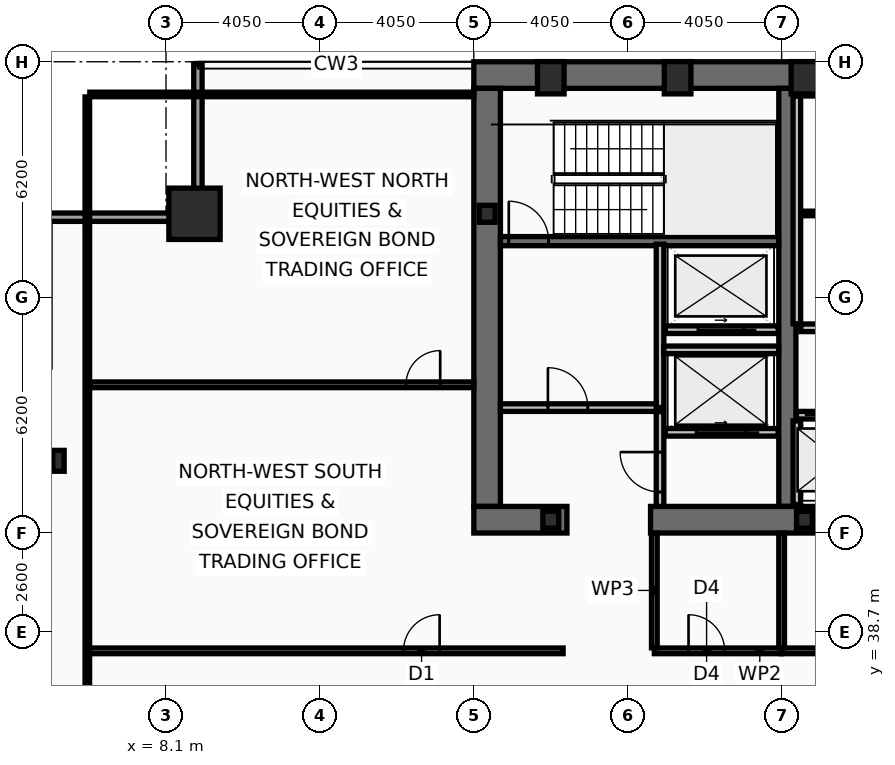
"""IFC4 building model, lengths in metres.
Left out: names, types, materials, properties, quantities, classifications, styles, units other than length and angle.
Written with IfcOpenShell. Run it as: python <this file> out.ifc"""

import sys

from ifc_helpers import new_model, si_unit, direction, frame, frame_2d, origin, origin_2d, place, context, subcontext, project, spatial, rectangle, hollow_rectangle, i_section, extrude, element, fill, save


model = new_model("IFC4")
c1 = context("Model", 3, precision=1e-05, world=origin(), true_north=direction((0.0, 1.0)))
c2 = subcontext(c1, "Body", "Model", "MODEL_VIEW")
j1 = project(units=[si_unit("LENGTHUNIT", "METRE"), si_unit("PLANEANGLEUNIT", "RADIAN")], contexts=[c1])
p1 = place(None, origin())
s1 = spatial("IfcSite", under=j1, at=p1, CompositionType="ELEMENT")
p2 = place(p1, origin())
s2 = spatial("IfcBuilding", under=s1, at=p2, CompositionType="ELEMENT")
p3 = place(p2, frame((0.0, 0.0, 154.2)))
s3 = spatial("IfcBuildingStorey", under=s2, at=p3, CompositionType="ELEMENT", Elevation=154.2)
p4 = place(p3, frame((16.2, 53.35, 0.0), z_axis=(0.0, 0.0, 1.0), x_axis=(1.0, 0.0, 0.0)))
e1 = element("IfcWall", 1, at=p4, inside=s3, PredefinedType="SHEAR", context=c2, shape_type="SweptSolid", body=[
    extrude(rectangle(XDim=40.5, YDim=0.7, at=frame_2d((20.25, 0.0))), origin(), (0.0, 0.0, 1.0), 3.44),
])
p5 = place(p3, frame((16.55, 42.0, 0.0), z_axis=(0.0, 0.0, 1.0), x_axis=(0.0, 1.0, 0.0)))
e2 = element("IfcWall", 2, at=p5, inside=s3, PredefinedType="SHEAR", context=c2, shape_type="SweptSolid", body=[
    extrude(rectangle(XDim=11.0, YDim=0.7, at=frame_2d((5.5, 0.0))), origin(), (0.0, 0.0, 1.0), 3.44),
])
p6 = place(p3, frame((24.45, 42.0, 0.0), z_axis=(0.0, 0.0, 1.0), x_axis=(0.0, 1.0, 0.0)))
e3 = element("IfcWall", 3, at=p6, inside=s3, PredefinedType="SHEAR", context=c2, shape_type="SweptSolid", body=[
    extrude(rectangle(XDim=11.0, YDim=0.45, at=frame_2d((5.5, 0.0))), origin(), (0.0, 0.0, 1.0), 3.44),
])
p7 = place(p3, frame((18.65, 41.65, 0.0), z_axis=(0.0, 0.0, 1.0), x_axis=(-1.0, 0.0, 0.0)))
e4 = element("IfcWall", 4, at=p7, inside=s3, PredefinedType="SHEAR", context=c2, shape_type="SweptSolid", body=[
    extrude(rectangle(XDim=2.45, YDim=0.7, at=frame_2d((1.225, 0.0))), origin(), (0.0, 0.0, 1.0), 3.44),
])
p8 = place(p3, frame((32.3, 41.65, 0.0), z_axis=(0.0, 0.0, 1.0), x_axis=(-1.0, 0.0, 0.0)))
e5 = element("IfcWall", 5, at=p8, inside=s3, PredefinedType="SHEAR", context=c2, shape_type="SweptSolid", body=[
    extrude(rectangle(XDim=11.45, YDim=0.7, at=frame_2d((5.725, 0.0))), origin(), (0.0, 0.0, 1.0), 3.44),
])
p9 = place(p3, frame((16.9, 48.98, 0.0), z_axis=(0.0, 0.0, 1.0), x_axis=(1.0, 0.0, 0.0)))
e6 = element("IfcWall", 6, at=p9, inside=s3, PredefinedType="SHEAR", context=c2, shape_type="SweptSolid", body=[
    extrude(rectangle(XDim=7.32, YDim=0.24, at=frame_2d((3.66, 0.0))), origin(), (0.0, 0.0, 1.0), 3.44),
])
p10 = place(p9, frame((0.22, 0.0, 0.0)))
e7 = element("IfcOpeningElement", 7, at=p10, cuts=e6, PredefinedType="OPENING", context=c2, shape_type="SweptSolid", body=[
    extrude(rectangle(XDim=1.05, YDim=2.15, at=frame_2d((0.525, 1.075))), frame((0.0, 0.13, 0.0), z_axis=(0.0, -1.0, 0.0), x_axis=(1.0, 0.0, 0.0)), (0.0, 0.0, 1.0), 0.26),
])
p11 = place(p3, frame((8.85, 49.7, 0.0), z_axis=(0.0, 0.0, 1.0), x_axis=(1.0, 0.0, 0.0)))
e8 = element("IfcColumn", 8, at=p11, inside=s3, PredefinedType="COLUMN", context=c2, shape_type="SweptSolid", body=[
    extrude(hollow_rectangle(XDim=1.35, YDim=1.35, WallThickness=0.065, at=origin_2d()), origin(), (0.0, 0.0, 1.0), 3.6),
])
for number, where, z_axis, x_axis in (
    (9, (18.225, 53.28, 0.0), (0.0, 0.0, 1.0), (1.0, 0.0, 0.0)),
    (10, (21.562, 53.28, 0.0), (0.0, 0.0, 1.0), (1.0, 0.0, 0.0)),
    (11, (24.9, 53.28, 0.0), (0.0, 0.0, 1.0), (1.0, 0.0, 0.0)),
):
    element("IfcColumn", number, at=place(p3, frame(where, z_axis=z_axis, x_axis=x_axis)), inside=s3, PredefinedType="COLUMN", context=c2, shape_type="SweptSolid", body=[
        extrude(hollow_rectangle(XDim=0.7, YDim=0.85, WallThickness=0.05, at=origin_2d()), origin(), (0.0, 0.0, 1.0), 3.6),
    ])
p12 = place(p3, frame((5.27, 43.2, 0.0), z_axis=(0.0, 0.0, 1.0), x_axis=(1.0, 0.0, 0.0)))
e12 = element("IfcColumn", 12, at=p12, inside=s3, PredefinedType="COLUMN", context=c2, shape_type="SweptSolid", body=[
    extrude(i_section(OverallWidth=0.3, OverallDepth=0.55, WebThickness=0.015, FlangeThickness=0.029, at=origin_2d()), origin(), (0.0, 0.0, 1.0), 3.6),
])
for number, where, z_axis, x_axis in (
    (13, (16.55, 49.7, 0.0), (0.0, 0.0, 1.0), (1.0, 0.0, 0.0)),
    (14, (18.225, 41.65, 0.0), (0.0, 0.0, 1.0), (1.0, 0.0, 0.0)),
    (15, (24.9, 41.65, 0.0), (0.0, 0.0, 1.0), (1.0, 0.0, 0.0)),
):
    element("IfcColumn", number, at=place(p3, frame(where, z_axis=z_axis, x_axis=x_axis)), inside=s3, PredefinedType="COLUMN", context=c2, shape_type="SweptSolid", body=[
        extrude(i_section(OverallWidth=0.416, OverallDepth=0.446, WebThickness=0.039, FlangeThickness=0.063, at=origin_2d()), origin(), (0.0, 0.0, 1.0), 3.6),
    ])
p13 = place(p3, frame((4.83, 49.61, 0.0), z_axis=(0.0, 0.0, 1.0), x_axis=(1.0, 0.0, 0.0)))
e16 = element("IfcWall", 16, at=p13, inside=s3, PredefinedType="SOLIDWALL", context=c2, shape_type="SweptSolid", body=[
    extrude(rectangle(XDim=4.22, YDim=0.22, at=frame_2d((2.11, 0.0))), origin(), (0.0, 0.0, 1.0), 2.83),
])
p14 = place(p3, frame((8.94, 49.72, 0.0), z_axis=(0.0, 0.0, 1.0), x_axis=(0.0, 1.0, 0.0)))
e17 = element("IfcWall", 17, at=p14, inside=s3, PredefinedType="SOLIDWALL", context=c2, shape_type="SweptSolid", body=[
    extrude(rectangle(XDim=3.91, YDim=0.22, at=frame_2d((1.955, 0.0))), origin(), (0.0, 0.0, 1.0), 2.83),
])
p15 = place(p3, frame((24.69, 44.4, 0.0), z_axis=(0.0, 0.0, 1.0), x_axis=(1.0, 0.0, 0.0)))
e18 = element("IfcWall", 18, at=p15, inside=s3, PredefinedType="PARTITIONING", context=c2, shape_type="SweptSolid", body=[
    extrude(rectangle(XDim=6.53, YDim=0.2, at=frame_2d((3.265, 0.0))), origin(), (0.0, 0.0, 1.0), 3.44),
])
p16 = place(p15, frame((0.53, 0.0, 0.0)))
e19 = element("IfcOpeningElement", 19, at=p16, cuts=e18, PredefinedType="OPENING", context=c2, shape_type="SweptSolid", body=[
    extrude(rectangle(XDim=1.1, YDim=2.18, at=frame_2d((0.55, 1.09))), frame((0.0, 0.11, 0.0), z_axis=(0.0, -1.0, 0.0), x_axis=(1.0, 0.0, 0.0)), (0.0, 0.0, 1.0), 0.22),
])
p17 = place(p15, frame((2.69, 0.0, 0.0)))
e20 = element("IfcOpeningElement", 20, at=p17, cuts=e18, PredefinedType="OPENING", context=c2, shape_type="SweptSolid", body=[
    extrude(rectangle(XDim=1.1, YDim=2.18, at=frame_2d((0.55, 1.09))), frame((0.0, 0.11, 0.0), z_axis=(0.0, -1.0, 0.0), x_axis=(1.0, 0.0, 0.0)), (0.0, 0.0, 1.0), 0.22),
])
p18 = place(p15, frame((4.85, 0.0, 0.0)))
e21 = element("IfcOpeningElement", 21, at=p18, cuts=e18, PredefinedType="OPENING", context=c2, shape_type="SweptSolid", body=[
    extrude(rectangle(XDim=1.1, YDim=2.18, at=frame_2d((0.55, 1.09))), frame((0.0, 0.11, 0.0), z_axis=(0.0, -1.0, 0.0), x_axis=(1.0, 0.0, 0.0)), (0.0, 0.0, 1.0), 0.22),
])
p19 = place(p3, frame((24.21, 43.95, 0.0), z_axis=(0.0, 0.0, 1.0), x_axis=(-1.0, 0.0, 0.0)))
e22 = element("IfcWall", 22, at=p19, inside=s3, PredefinedType="PARTITIONING", context=c2, shape_type="SweptSolid", body=[
    extrude(rectangle(XDim=2.97, YDim=0.2, at=frame_2d((1.485, 0.0))), origin(), (0.0, 0.0, 1.0), 3.44),
])
p20 = place(p19, frame((0.86, 0.0, 0.0)))
e23 = element("IfcOpeningElement", 23, at=p20, cuts=e22, PredefinedType="OPENING", context=c2, shape_type="SweptSolid", body=[
    extrude(rectangle(XDim=1.3, YDim=2.18, at=frame_2d((0.65, 1.09))), frame((0.0, 0.11, 0.0), z_axis=(0.0, -1.0, 0.0), x_axis=(1.0, 0.0, 0.0)), (0.0, 0.0, 1.0), 0.22),
])
p21 = place(p3, frame((24.21, 46.65, 0.0), z_axis=(0.0, 0.0, 1.0), x_axis=(-1.0, 0.0, 0.0)))
e24 = element("IfcWall", 24, at=p21, inside=s3, PredefinedType="PARTITIONING", context=c2, shape_type="SweptSolid", body=[
    extrude(rectangle(XDim=2.97, YDim=0.2, at=frame_2d((1.485, 0.0))), origin(), (0.0, 0.0, 1.0), 3.44),
])
p22 = place(p21, frame((0.91, 0.0, 0.0)))
e25 = element("IfcOpeningElement", 25, at=p22, cuts=e24, PredefinedType="OPENING", context=c2, shape_type="SweptSolid", body=[
    extrude(rectangle(XDim=1.2, YDim=2.18, at=frame_2d((0.6, 1.09))), frame((0.0, 0.11, 0.0), z_axis=(0.0, -1.0, 0.0), x_axis=(1.0, 0.0, 0.0)), (0.0, 0.0, 1.0), 0.22),
])
p23 = place(p3, frame((21.1, 44.6, 0.0), z_axis=(0.0, 0.0, 1.0), x_axis=(0.0, 1.0, 0.0)))
e26 = element("IfcWall", 26, at=p23, inside=s3, PredefinedType="PARTITIONING", context=c2, shape_type="SweptSolid", body=[
    extrude(rectangle(XDim=4.3, YDim=0.2, at=frame_2d((2.15, 0.0))), origin(), (0.0, 0.0, 1.0), 3.44),
])
p24 = place(p3, frame((16.9, 44.6, 0.0), z_axis=(0.0, 0.0, 1.0), x_axis=(1.0, 0.0, 0.0)))
e27 = element("IfcWall", 27, at=p24, inside=s3, PredefinedType="PARTITIONING", context=c2, shape_type="SweptSolid", body=[
    extrude(rectangle(XDim=4.1, YDim=0.2, at=frame_2d((2.05, 0.0))), origin(), (0.0, 0.0, 1.0), 3.44),
])
p25 = place(p24, frame((1.25, 0.0, 0.0)))
e28 = element("IfcOpeningElement", 28, at=p25, cuts=e27, PredefinedType="OPENING", context=c2, shape_type="SweptSolid", body=[
    extrude(rectangle(XDim=1.05, YDim=2.15, at=frame_2d((0.525, 1.075))), frame((0.0, 0.11, 0.0), z_axis=(0.0, -1.0, 0.0), x_axis=(1.0, 0.0, 0.0)), (0.0, 0.0, 1.0), 0.22),
])
p26 = place(p3, frame((21.2, 46.12, 0.0), z_axis=(0.0, 0.0, 1.0), x_axis=(1.0, 0.0, 0.0)))
e29 = element("IfcWall", 29, at=p26, inside=s3, PredefinedType="PARTITIONING", context=c2, shape_type="SweptSolid", body=[
    extrude(rectangle(XDim=3.02, YDim=0.2, at=frame_2d((1.51, 0.0))), origin(), (0.0, 0.0, 1.0), 3.44),
])
p27 = place(p3, frame((21.1, 42.0, 0.0), z_axis=(0.0, 0.0, 1.0), x_axis=(0.0, 1.0, 0.0)))
e30 = element("IfcWall", 30, at=p27, inside=s3, PredefinedType="PARTITIONING", context=c2, shape_type="SweptSolid", body=[
    extrude(rectangle(XDim=2.495, YDim=0.2, at=frame_2d((1.248, 0.0))), origin(), (0.0, 0.0, 1.0), 3.44),
])
p28 = place(p27, frame((0.38, 0.0, 0.0)))
e31 = element("IfcOpeningElement", 31, at=p28, cuts=e30, PredefinedType="OPENING", context=c2, shape_type="SweptSolid", body=[
    extrude(rectangle(XDim=1.05, YDim=2.15, at=frame_2d((0.525, 1.075))), frame((0.0, 0.11, 0.0), z_axis=(0.0, -1.0, 0.0), x_axis=(1.0, 0.0, 0.0)), (0.0, 0.0, 1.0), 0.22),
])
p29 = place(p3, frame((24.7, 46.805, 0.0), z_axis=(0.0, 0.0, 1.0), x_axis=(0.0, 1.0, 0.0)))
e32 = element("IfcWall", 32, at=p29, inside=s3, PredefinedType="PARTITIONING", context=c2, shape_type="SweptSolid", body=[
    extrude(rectangle(XDim=5.99, YDim=0.2, at=frame_2d((2.995, 0.0))), origin(), (0.0, 0.0, 1.0), 3.44),
])
p30 = place(p3, frame((24.805, 52.86, 0.0), z_axis=(0.0, 0.0, 1.0), x_axis=(1.0, 0.0, 0.0)))
e33 = element("IfcWall", 33, at=p30, inside=s3, PredefinedType="PARTITIONING", context=c2, shape_type="SweptSolid", body=[
    extrude(rectangle(XDim=7.51, YDim=0.12, at=frame_2d((3.755, 0.0))), origin(), (0.0, 0.0, 1.0), 3.44),
])
p31 = place(p3, frame((24.805, 49.709, 0.0), z_axis=(0.0, 0.0, 1.0), x_axis=(1.0, 0.0, 0.0)))
e34 = element("IfcWall", 34, at=p31, inside=s3, PredefinedType="PARTITIONING", context=c2, shape_type="SweptSolid", body=[
    extrude(rectangle(XDim=7.51, YDim=0.12, at=frame_2d((3.755, 0.0))), origin(), (0.0, 0.0, 1.0), 3.44),
])
p32 = place(p31, frame((2.4, 0.0, 0.0)))
e35 = element("IfcOpeningElement", 35, at=p32, cuts=e34, PredefinedType="OPENING", context=c2, shape_type="SweptSolid", body=[
    extrude(rectangle(XDim=0.9, YDim=2.05, at=frame_2d((0.45, 1.025))), frame((0.0, 0.07, 0.0), z_axis=(0.0, -1.0, 0.0), x_axis=(1.0, 0.0, 0.0)), (0.0, 0.0, 1.0), 0.14),
])
p33 = place(p3, frame((24.805, 46.7, 0.0), z_axis=(0.0, 0.0, 1.0), x_axis=(1.0, 0.0, 0.0)))
e36 = element("IfcWall", 36, at=p33, inside=s3, PredefinedType="PARTITIONING", context=c2, shape_type="SweptSolid", body=[
    extrude(rectangle(XDim=7.51, YDim=0.2, at=frame_2d((3.755, 0.0))), origin(), (0.0, 0.0, 1.0), 3.44),
])
p34 = place(p33, frame((2.4, 0.0, 0.0)))
e37 = element("IfcOpeningElement", 37, at=p34, cuts=e36, PredefinedType="OPENING", context=c2, shape_type="SweptSolid", body=[
    extrude(rectangle(XDim=0.95, YDim=2.1, at=frame_2d((0.475, 1.05))), frame((0.0, 0.11, 0.0), z_axis=(0.0, -1.0, 0.0), x_axis=(1.0, 0.0, 0.0)), (0.0, 0.0, 1.0), 0.22),
])
p35 = place(p3, frame((24.7, 42.05, 0.0), z_axis=(0.0, 0.0, 1.0), x_axis=(0.0, 1.0, 0.0)))
e38 = element("IfcWall", 38, at=p35, inside=s3, PredefinedType="PARTITIONING", context=c2, shape_type="SweptSolid", body=[
    extrude(rectangle(XDim=2.2, YDim=0.2, at=frame_2d((1.1, 0.0))), origin(), (0.0, 0.0, 1.0), 3.44),
])
p36 = place(p3, frame((20.95, 38.2, 0.0), z_axis=(0.0, 0.0, 1.0), x_axis=(1.0, 0.0, 0.0)))
e39 = element("IfcWall", 39, at=p36, inside=s3, PredefinedType="PARTITIONING", context=c2, shape_type="SweptSolid", body=[
    extrude(rectangle(XDim=3.35, YDim=0.15, at=frame_2d((1.675, 0.0))), origin(), (0.0, 0.0, 1.0), 3.44),
])
p37 = place(p36, frame((0.9, 0.0, 0.0)))
e40 = element("IfcOpeningElement", 40, at=p37, cuts=e39, PredefinedType="OPENING", context=c2, shape_type="SweptSolid", body=[
    extrude(rectangle(XDim=0.95, YDim=2.05, at=frame_2d((0.475, 1.025))), frame((0.0, 0.085, 0.0), z_axis=(0.0, -1.0, 0.0), x_axis=(1.0, 0.0, 0.0)), (0.0, 0.0, 1.0), 0.17),
])
p38 = place(p3, frame((24.3, 38.2, 0.0), z_axis=(0.0, 0.0, 1.0), x_axis=(1.0, 0.0, 0.0)))
e41 = element("IfcWall", 41, at=p38, inside=s3, PredefinedType="PARTITIONING", context=c2, shape_type="SweptSolid", body=[
    extrude(rectangle(XDim=4.9, YDim=0.15, at=frame_2d((2.45, 0.0))), origin(), (0.0, 0.0, 1.0), 2.73),
])
p39 = place(p38, frame((0.9, 0.0, 0.0)))
e42 = element("IfcOpeningElement", 42, at=p39, cuts=e41, PredefinedType="OPENING", context=c2, shape_type="SweptSolid", body=[
    extrude(rectangle(XDim=0.95, YDim=2.05, at=frame_2d((0.475, 1.025))), frame((0.0, 0.085, 0.0), z_axis=(0.0, -1.0, 0.0), x_axis=(1.0, 0.0, 0.0)), (0.0, 0.0, 1.0), 0.17),
])
for number, where, z_axis, x_axis in (
    (43, (20.95, 38.28, 0.0), (0.0, 0.0, 1.0), (0.0, 1.0, 0.0)),
    (44, (24.3, 38.28, 0.0), (0.0, 0.0, 1.0), (0.0, 1.0, 0.0)),
):
    element("IfcWall", number, at=place(p3, frame(where, z_axis=z_axis, x_axis=x_axis)), inside=s3, PredefinedType="PARTITIONING", context=c2, shape_type="SweptSolid", body=[
        extrude(rectangle(XDim=3.02, YDim=0.15, at=frame_2d((1.51, 0.0))), origin(), (0.0, 0.0, 1.0), 3.44),
    ])
p40 = place(p3, frame((6.03, 38.2, 0.0), z_axis=(0.0, 0.0, 1.0), x_axis=(1.0, 0.0, 0.0)))
e45 = element("IfcWall", 45, at=p40, inside=s3, PredefinedType="PARTITIONING", context=c2, shape_type="SweptSolid", body=[
    extrude(rectangle(XDim=12.52, YDim=0.15, at=frame_2d((6.26, 0.0))), origin(), (0.0, 0.0, 1.0), 2.73),
])
p41 = place(p40, frame((8.32, 0.0, 0.0)))
e46 = element("IfcOpeningElement", 46, at=p41, cuts=e45, PredefinedType="OPENING", context=c2, shape_type="SweptSolid", body=[
    extrude(rectangle(XDim=0.95, YDim=2.05, at=frame_2d((0.475, 1.025))), frame((0.0, 0.085, 0.0), z_axis=(0.0, -1.0, 0.0), x_axis=(1.0, 0.0, 0.0)), (0.0, 0.0, 1.0), 0.17),
])
p42 = place(p3, frame((6.095, 45.2, 0.0), z_axis=(0.0, 0.0, 1.0), x_axis=(1.0, 0.0, 0.0)))
e47 = element("IfcWall", 47, at=p42, inside=s3, PredefinedType="PARTITIONING", context=c2, shape_type="SweptSolid", body=[
    extrude(rectangle(XDim=10.105, YDim=0.15, at=frame_2d((5.052, 0.0))), origin(), (0.0, 0.0, 1.0), 2.83),
])
p43 = place(p42, frame((8.32, 0.0, 0.0)))
e48 = element("IfcOpeningElement", 48, at=p43, cuts=e47, PredefinedType="OPENING", context=c2, shape_type="SweptSolid", body=[
    extrude(rectangle(XDim=0.9, YDim=2.05, at=frame_2d((0.45, 1.025))), frame((0.0, 0.085, 0.0), z_axis=(0.0, -1.0, 0.0), x_axis=(1.0, 0.0, 0.0)), (0.0, 0.0, 1.0), 0.17),
])
p44 = place(p3, frame((6.03, 10.665, 0.0), z_axis=(0.0, 0.0, 1.0), x_axis=(0.0, 1.0, 0.0)))
e49 = element("IfcWall", 49, at=p44, inside=s3, PredefinedType="PARTITIONING", context=c2, shape_type="SweptSolid", body=[
    extrude(rectangle(XDim=42.11, YDim=0.12, at=frame_2d((21.055, 0.0))), origin(), (0.0, 0.0, 1.0), 2.73),
])
p45 = place(p3, frame((6.095, 52.84, 0.0), z_axis=(0.0, 0.0, 1.0), x_axis=(1.0, 0.0, 0.0)))
e50 = element("IfcWall", 50, at=p45, inside=s3, PredefinedType="PARTITIONING", context=c2, shape_type="SweptSolid", body=[
    extrude(rectangle(XDim=10.105, YDim=0.12, at=frame_2d((5.052, 0.0))), origin(), (0.0, 0.0, 1.0), 3.44),
])
p46 = place(p10, origin())
e51 = element("IfcDoor", 51, at=p46, inside=s3, OperationType="SINGLE_SWING_LEFT", PredefinedType="DOOR", context=c2, shape_type="SweptSolid", body=[
    extrude(rectangle(XDim=1.05, YDim=2.15, at=frame_2d((0.525, 1.075))), frame((0.0, 0.025, 0.0), z_axis=(0.0, -1.0, 0.0), x_axis=(1.0, 0.0, 0.0)), (0.0, 0.0, 1.0), 0.05),
])
fill(e7, e51)
p47 = place(p20, origin())
e52 = element("IfcDoor", 52, at=p47, inside=s3, OperationType="SLIDING_TO_LEFT", PredefinedType="DOOR", context=c2, shape_type="SweptSolid", body=[
    extrude(rectangle(XDim=1.3, YDim=2.18, at=frame_2d((0.65, 1.09))), frame((0.0, 0.025, 0.0), z_axis=(0.0, -1.0, 0.0), x_axis=(1.0, 0.0, 0.0)), (0.0, 0.0, 1.0), 0.05),
])
fill(e23, e52)
p48 = place(p22, origin())
e53 = element("IfcDoor", 53, at=p48, inside=s3, OperationType="SLIDING_TO_LEFT", PredefinedType="DOOR", context=c2, shape_type="SweptSolid", body=[
    extrude(rectangle(XDim=1.2, YDim=2.18, at=frame_2d((0.6, 1.09))), frame((0.0, 0.025, 0.0), z_axis=(0.0, -1.0, 0.0), x_axis=(1.0, 0.0, 0.0)), (0.0, 0.0, 1.0), 0.05),
])
fill(e25, e53)
p49 = place(p25, origin())
e54 = element("IfcDoor", 54, at=p49, inside=s3, OperationType="SINGLE_SWING_LEFT", PredefinedType="DOOR", context=c2, shape_type="SweptSolid", body=[
    extrude(rectangle(XDim=1.05, YDim=2.15, at=frame_2d((0.525, 1.075))), frame((0.0, 0.025, 0.0), z_axis=(0.0, -1.0, 0.0), x_axis=(1.0, 0.0, 0.0)), (0.0, 0.0, 1.0), 0.05),
])
fill(e28, e54)
p50 = place(p28, origin())
e55 = element("IfcDoor", 55, at=p50, inside=s3, OperationType="SINGLE_SWING_RIGHT", PredefinedType="DOOR", context=c2, shape_type="SweptSolid", body=[
    extrude(rectangle(XDim=1.05, YDim=2.15, at=frame_2d((0.525, 1.075))), frame((0.0, 0.025, 0.0), z_axis=(0.0, -1.0, 0.0), x_axis=(1.0, 0.0, 0.0)), (0.0, 0.0, 1.0), 0.05),
])
fill(e31, e55)
p51 = place(p37, origin())
e56 = element("IfcDoor", 56, at=p51, inside=s3, OperationType="SINGLE_SWING_LEFT", PredefinedType="DOOR", context=c2, shape_type="SweptSolid", body=[
    extrude(rectangle(XDim=0.95, YDim=2.05, at=frame_2d((0.475, 1.025))), frame((0.0, 0.025, 0.0), z_axis=(0.0, -1.0, 0.0), x_axis=(1.0, 0.0, 0.0)), (0.0, 0.0, 1.0), 0.05),
])
fill(e40, e56)
p52 = place(p41, origin())
e57 = element("IfcDoor", 57, at=p52, inside=s3, OperationType="SINGLE_SWING_RIGHT", PredefinedType="DOOR", context=c2, shape_type="SweptSolid", body=[
    extrude(rectangle(XDim=0.95, YDim=2.05, at=frame_2d((0.475, 1.025))), frame((0.0, 0.025, 0.0), z_axis=(0.0, -1.0, 0.0), x_axis=(1.0, 0.0, 0.0)), (0.0, 0.0, 1.0), 0.05),
])
fill(e46, e57)
p53 = place(p43, origin())
e58 = element("IfcDoor", 58, at=p53, inside=s3, OperationType="SINGLE_SWING_RIGHT", PredefinedType="DOOR", context=c2, shape_type="SweptSolid", body=[
    extrude(rectangle(XDim=0.9, YDim=2.05, at=frame_2d((0.45, 1.025))), frame((0.0, 0.025, 0.0), z_axis=(0.0, -1.0, 0.0), x_axis=(1.0, 0.0, 0.0)), (0.0, 0.0, 1.0), 0.05),
])
fill(e48, e58)
save(model, sys.argv[1])
